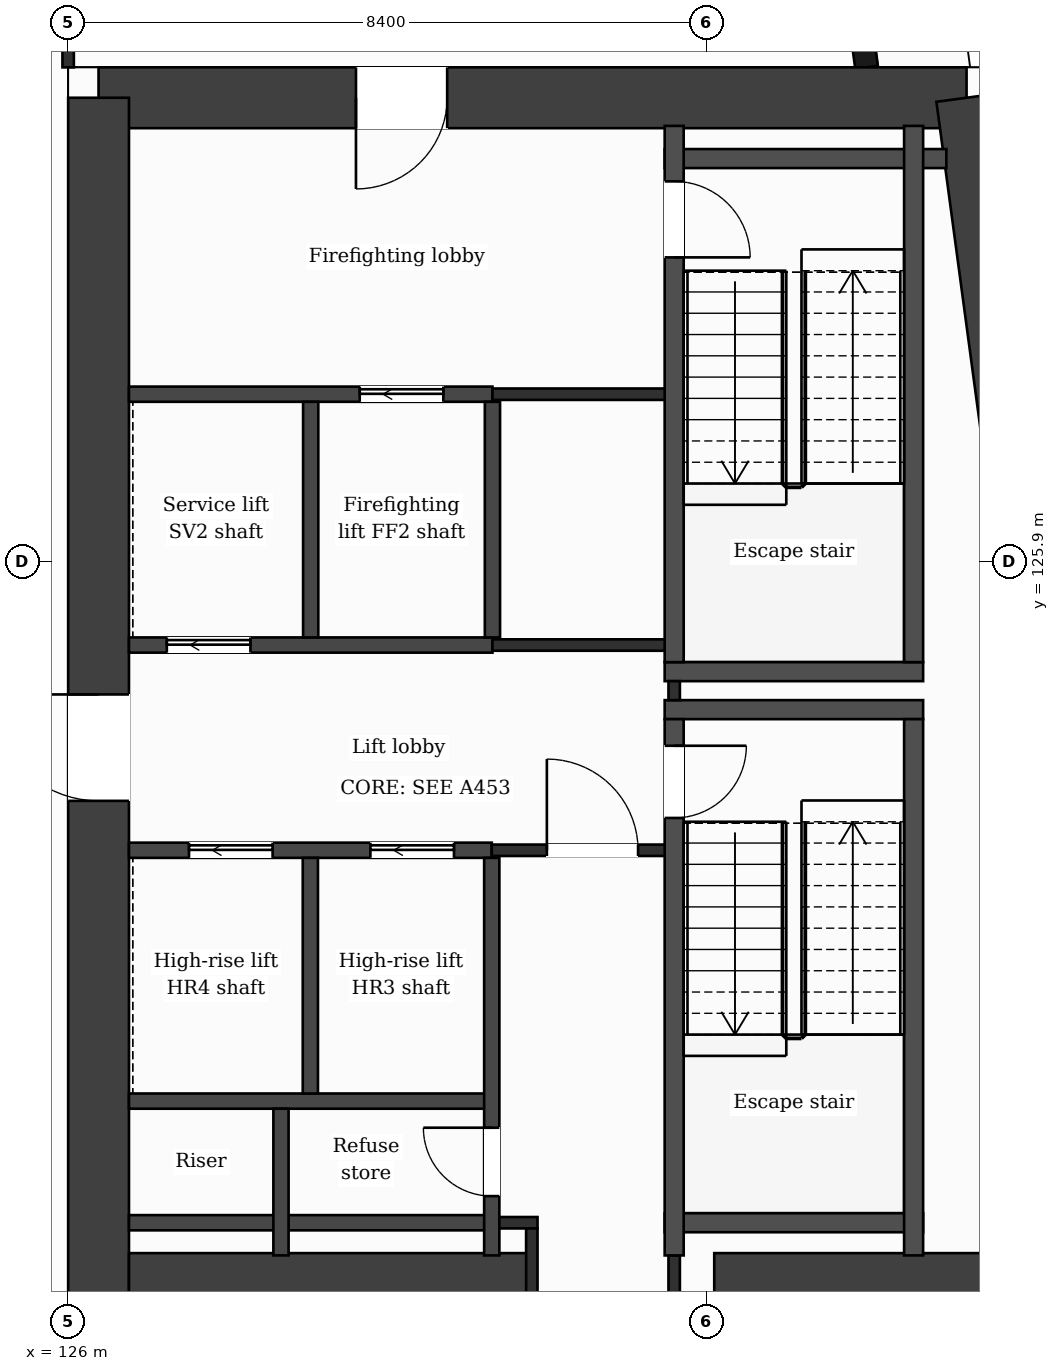
"""IFC4 building model, lengths in metres.
Left out: names, types, materials, properties, quantities, classifications, styles, units other than length and angle.
Written with IfcOpenShell. Run it as: python <this file> out.ifc"""

import sys

from ifc_helpers import new_model, si_unit, direction, frame, frame_2d, origin, place, context, subcontext, project, spatial, rectangle, extrude, element, fill, save


model = new_model("IFC4")
c1 = context("Model", 3, precision=1e-05, world=origin(), true_north=direction((0.0, 1.0)))
c2 = subcontext(c1, "Body", "Model", "MODEL_VIEW")
j1 = project(units=[si_unit("LENGTHUNIT", "METRE"), si_unit("PLANEANGLEUNIT", "RADIAN")], contexts=[c1])
p1 = place(None, origin())
s1 = spatial("IfcSite", under=j1, at=p1, CompositionType="ELEMENT")
p2 = place(p1, origin())
s2 = spatial("IfcBuilding", under=s1, at=p2, CompositionType="ELEMENT")
p3 = place(p2, frame((0.0, 0.0, 217.0)))
s3 = spatial("IfcBuildingStorey", under=s2, at=p3, CompositionType="ELEMENT", Elevation=217.0)
p4 = place(p3, frame((126.4, 132.0, 0.0), z_axis=(0.0, 0.0, 1.0), x_axis=(1.0, 0.0, 0.0)))
e1 = element("IfcWall", 1, at=p4, inside=s3, PredefinedType="SHEAR", context=c2, shape_type="SweptSolid", body=[
    extrude(rectangle(XDim=11.42, YDim=0.8, at=frame_2d((5.71, 0.0))), origin(), (0.0, 0.0, 1.0), 3.7),
])
p5 = place(p4, frame((3.386, 0.0, 0.0)))
e2 = element("IfcOpeningElement", 2, at=p5, cuts=e1, PredefinedType="OPENING", context=c2, shape_type="SweptSolid", body=[
    extrude(rectangle(XDim=1.2, YDim=2.1, at=frame_2d((0.6, 1.05))), frame((0.0, 0.41, 0.0), z_axis=(0.0, -1.0, 0.0), x_axis=(1.0, 0.0, 0.0)), (0.0, 0.0, 1.0), 0.82),
])
p6 = place(p3, frame((137.82, 132.0, 0.0), z_axis=(0.0, 0.0, 1.0), x_axis=(0.133408347329, -0.991061154956, 0.0)))
e3 = element("IfcWall", 3, at=p6, inside=s3, PredefinedType="SHEAR", context=c2, shape_type="SweptSolid", body=[
    extrude(rectangle(XDim=21.391, YDim=0.8, at=frame_2d((10.696, 0.0))), origin(), (0.0, 0.0, 1.0), 3.7),
])
p7 = place(p3, frame((126.4, 110.8, 0.0), z_axis=(0.0, 0.0, 1.0), x_axis=(0.0, 1.0, 0.0)))
e4 = element("IfcWall", 4, at=p7, inside=s3, PredefinedType="SHEAR", context=c2, shape_type="SweptSolid", body=[
    extrude(rectangle(XDim=21.2, YDim=0.8, at=frame_2d((10.6, 0.0))), origin(), (0.0, 0.0, 1.0), 3.7),
])
p8 = place(p7, frame((11.95, 0.0, 0.0)))
e5 = element("IfcOpeningElement", 5, at=p8, cuts=e4, PredefinedType="OPENING", context=c2, shape_type="SweptSolid", body=[
    extrude(rectangle(XDim=1.4, YDim=2.1, at=frame_2d((0.7, 1.05))), frame((0.0, 0.41, 0.0), z_axis=(0.0, -1.0, 0.0), x_axis=(1.0, 0.0, 0.0)), (0.0, 0.0, 1.0), 0.82),
])
p9 = place(p3, frame((126.8, 116.4, 0.0), z_axis=(0.0, 0.0, 1.0), x_axis=(1.0, 0.0, 0.0)))
e6 = element("IfcWall", 6, at=p9, inside=s3, PredefinedType="SHEAR", context=c2, shape_type="SweptSolid", body=[
    extrude(rectangle(XDim=5.3, YDim=0.8, at=frame_2d((2.65, 0.0))), origin(), (0.0, 0.0, 1.0), 3.7),
])
p10 = place(p3, frame((134.5, 116.4, 0.0), z_axis=(0.0, 0.0, 1.0), x_axis=(1.0, 0.0, 0.0)))
e7 = element("IfcWall", 7, at=p10, inside=s3, PredefinedType="SHEAR", context=c2, shape_type="SweptSolid", body=[
    extrude(rectangle(XDim=5.077, YDim=0.8, at=frame_2d((2.539, 0.0))), origin(), (0.0, 0.0, 1.0), 3.7),
])
p11 = place(p3, frame((136.504, 132.4, 0.0), z_axis=(0.0, 0.0, 1.0), x_axis=(-0.133399697462, 0.99106231929, 0.0)))
e8 = element("IfcWall", 8, at=p11, inside=s3, PredefinedType="SOLIDWALL", context=c2, shape_type="SweptSolid", body=[
    extrude(rectangle(XDim=6.74, YDim=0.3, at=frame_2d((3.37, 0.0))), origin(), (0.0, 0.0, 1.0), 3.38),
])
p12 = place(p11, frame((1.115, 0.0, 0.0)))
e9 = element("IfcOpeningElement", 9, at=p12, cuts=e8, PredefinedType="OPENING", context=c2, shape_type="SweptSolid", body=[
    extrude(rectangle(XDim=1.2, YDim=2.4, at=frame_2d((0.6, 1.2))), frame((0.0, 0.16, 0.0), z_axis=(0.0, -1.0, 0.0), x_axis=(1.0, 0.0, 0.0)), (0.0, 0.0, 1.0), 0.32),
])
p13 = place(p11, frame((3.835, 0.0, 0.9)))
e10 = element("IfcOpeningElement", 10, at=p13, cuts=e8, PredefinedType="OPENING", context=c2, shape_type="SweptSolid", body=[
    extrude(rectangle(XDim=2.4, YDim=2.1, at=frame_2d((1.2, 1.05))), frame((0.0, 0.16, 0.0), z_axis=(0.0, -1.0, 0.0), x_axis=(1.0, 0.0, 0.0)), (0.0, 0.0, 1.0), 0.32),
])
p14 = place(p3, frame((126.8, 117.2, 0.0), z_axis=(0.0, 0.0, 1.0), x_axis=(1.0, 0.0, 0.0)))
e11 = element("IfcWall", 11, at=p14, inside=s3, PredefinedType="PARTITIONING", context=c2, shape_type="SweptSolid", body=[
    extrude(rectangle(XDim=4.773, YDim=0.2, at=frame_2d((2.386, 0.0))), origin(), (0.0, 0.0, 1.0), 3.38),
])
p15 = place(p3, frame((131.573, 117.2, 0.0), z_axis=(0.0, 0.0, 1.0), x_axis=(1.0, 0.0, 0.0)))
e12 = element("IfcWall", 12, at=p15, inside=s3, PredefinedType="PARTITIONING", context=c2, shape_type="SweptSolid", body=[
    extrude(rectangle(XDim=0.602, YDim=0.15, at=frame_2d((0.301, 0.0))), origin(), (0.0, 0.0, 1.0), 3.38),
])
p16 = place(p3, frame((133.848, 117.2, 0.0), z_axis=(0.0, 0.0, 1.0), x_axis=(1.0, 0.0, 0.0)))
e13 = element("IfcWall", 13, at=p16, inside=s3, PredefinedType="PARTITIONING", context=c2, shape_type="SweptSolid", body=[
    extrude(rectangle(XDim=3.4, YDim=0.25, at=frame_2d((1.7, 0.0))), origin(), (0.0, 0.0, 1.0), 3.38),
])
p17 = place(p3, frame((126.8, 118.8, 0.0), z_axis=(0.0, 0.0, 1.0), x_axis=(1.0, 0.0, 0.0)))
e14 = element("IfcWall", 14, at=p17, inside=s3, PredefinedType="PARTITIONING", context=c2, shape_type="SweptSolid", body=[
    extrude(rectangle(XDim=4.773, YDim=0.2, at=frame_2d((2.386, 0.0))), origin(), (0.0, 0.0, 1.0), 3.38),
])
p18 = place(p3, frame((126.8, 122.1, 0.0), z_axis=(0.0, 0.0, 1.0), x_axis=(1.0, 0.0, 0.0)))
e15 = element("IfcWall", 15, at=p18, inside=s3, PredefinedType="PARTITIONING", context=c2, shape_type="SweptSolid", body=[
    extrude(rectangle(XDim=4.773, YDim=0.2, at=frame_2d((2.386, 0.0))), origin(), (0.0, 0.0, 1.0), 3.38),
])
p19 = place(p18, frame((3.176, 0.0, 0.0)))
e16 = element("IfcOpeningElement", 16, at=p19, cuts=e15, PredefinedType="OPENING", context=c2, shape_type="SweptSolid", body=[
    extrude(rectangle(XDim=1.1, YDim=2.1, at=frame_2d((0.55, 1.05))), frame((0.0, 0.11, 0.0), z_axis=(0.0, -1.0, 0.0), x_axis=(1.0, 0.0, 0.0)), (0.0, 0.0, 1.0), 0.22),
])
p20 = place(p18, frame((0.79, 0.0, 0.0)))
e17 = element("IfcOpeningElement", 17, at=p20, cuts=e15, PredefinedType="OPENING", context=c2, shape_type="SweptSolid", body=[
    extrude(rectangle(XDim=1.1, YDim=2.1, at=frame_2d((0.55, 1.05))), frame((0.0, 0.11, 0.0), z_axis=(0.0, -1.0, 0.0), x_axis=(1.0, 0.0, 0.0)), (0.0, 0.0, 1.0), 0.22),
])
p21 = place(p3, frame((131.573, 122.1, 0.0), z_axis=(0.0, 0.0, 1.0), x_axis=(1.0, 0.0, 0.0)))
e18 = element("IfcWall", 18, at=p21, inside=s3, PredefinedType="PARTITIONING", context=c2, shape_type="SweptSolid", body=[
    extrude(rectangle(XDim=2.4, YDim=0.15, at=frame_2d((1.2, 0.0))), origin(), (0.0, 0.0, 1.0), 3.38),
])
p22 = place(p21, frame((0.725, 0.0, 0.0)))
e19 = element("IfcOpeningElement", 19, at=p22, cuts=e18, PredefinedType="OPENING", context=c2, shape_type="SweptSolid", body=[
    extrude(rectangle(XDim=1.2, YDim=2.1, at=frame_2d((0.6, 1.05))), frame((0.0, 0.085, 0.0), z_axis=(0.0, -1.0, 0.0), x_axis=(1.0, 0.0, 0.0)), (0.0, 0.0, 1.0), 0.17),
])
for number, where, z_axis, x_axis in (
    (20, (133.848, 123.95, 0.0), (0.0, 0.0, 1.0), (1.0, 0.0, 0.0)),
    (21, (133.848, 124.45, 0.0), (0.0, 0.0, 1.0), (1.0, 0.0, 0.0)),
):
    element("IfcWall", number, at=place(p3, frame(where, z_axis=z_axis, x_axis=x_axis)), inside=s3, PredefinedType="PARTITIONING", context=c2, shape_type="SweptSolid", body=[
        extrude(rectangle(XDim=3.4, YDim=0.25, at=frame_2d((1.7, 0.0))), origin(), (0.0, 0.0, 1.0), 3.38),
    ])
p23 = place(p3, frame((126.8, 124.8, 0.0), z_axis=(0.0, 0.0, 1.0), x_axis=(1.0, 0.0, 0.0)))
e22 = element("IfcWall", 22, at=p23, inside=s3, PredefinedType="PARTITIONING", context=c2, shape_type="SweptSolid", body=[
    extrude(rectangle(XDim=4.782, YDim=0.2, at=frame_2d((2.391, 0.0))), origin(), (0.0, 0.0, 1.0), 3.38),
])
p24 = place(p23, frame((0.498, 0.0, 0.0)))
e23 = element("IfcOpeningElement", 23, at=p24, cuts=e22, PredefinedType="OPENING", context=c2, shape_type="SweptSolid", body=[
    extrude(rectangle(XDim=1.1, YDim=2.1, at=frame_2d((0.55, 1.05))), frame((0.0, 0.11, 0.0), z_axis=(0.0, -1.0, 0.0), x_axis=(1.0, 0.0, 0.0)), (0.0, 0.0, 1.0), 0.22),
])
p25 = place(p3, frame((131.582, 124.8, 0.0), z_axis=(0.0, 0.0, 1.0), x_axis=(1.0, 0.0, 0.0)))
e24 = element("IfcWall", 24, at=p25, inside=s3, PredefinedType="PARTITIONING", context=c2, shape_type="SweptSolid", body=[
    extrude(rectangle(XDim=2.516, YDim=0.15, at=frame_2d((1.258, 0.0))), origin(), (0.0, 0.0, 1.0), 3.38),
])
p26 = place(p3, frame((126.8, 128.1, 0.0), z_axis=(0.0, 0.0, 1.0), x_axis=(1.0, 0.0, 0.0)))
e25 = element("IfcWall", 25, at=p26, inside=s3, PredefinedType="PARTITIONING", context=c2, shape_type="SweptSolid", body=[
    extrude(rectangle(XDim=4.782, YDim=0.2, at=frame_2d((2.391, 0.0))), origin(), (0.0, 0.0, 1.0), 3.38),
])
p27 = place(p26, frame((3.036, 0.0, 0.0)))
e26 = element("IfcOpeningElement", 26, at=p27, cuts=e25, PredefinedType="OPENING", context=c2, shape_type="SweptSolid", body=[
    extrude(rectangle(XDim=1.1, YDim=2.1, at=frame_2d((0.55, 1.05))), frame((0.0, 0.11, 0.0), z_axis=(0.0, -1.0, 0.0), x_axis=(1.0, 0.0, 0.0)), (0.0, 0.0, 1.0), 0.22),
])
p28 = place(p3, frame((131.582, 128.1, 0.0), z_axis=(0.0, 0.0, 1.0), x_axis=(1.0, 0.0, 0.0)))
e27 = element("IfcWall", 27, at=p28, inside=s3, PredefinedType="PARTITIONING", context=c2, shape_type="SweptSolid", body=[
    extrude(rectangle(XDim=2.391, YDim=0.15, at=frame_2d((1.195, 0.0))), origin(), (0.0, 0.0, 1.0), 3.38),
])
p29 = place(p3, frame((133.848, 131.2, 0.0), z_axis=(0.0, 0.0, 1.0), x_axis=(1.0, 0.0, 0.0)))
e28 = element("IfcWall", 28, at=p29, inside=s3, PredefinedType="PARTITIONING", context=c2, shape_type="SweptSolid", body=[
    extrude(rectangle(XDim=3.706, YDim=0.25, at=frame_2d((1.853, 0.0))), origin(), (0.0, 0.0, 1.0), 3.38),
])
p30 = place(p3, frame((126.0, 132.4, 0.0), z_axis=(0.0, 0.0, 1.0), x_axis=(0.0, 1.0, 0.0)))
e29 = element("IfcWall", 29, at=p30, inside=s3, PredefinedType="PARTITIONING", context=c2, shape_type="SweptSolid", body=[
    extrude(rectangle(XDim=1.325, YDim=0.15, at=frame_2d((0.663, 0.0))), origin(), (0.0, 0.0, 1.0), 3.38),
])
p31 = place(p3, frame((128.8, 116.77, 0.0), z_axis=(0.0, 0.0, 1.0), x_axis=(0.0, 1.0, 0.0)))
e30 = element("IfcWall", 30, at=p31, inside=s3, PredefinedType="PARTITIONING", context=c2, shape_type="SweptSolid", body=[
    extrude(rectangle(XDim=1.93, YDim=0.2, at=frame_2d((0.965, 0.0))), origin(), (0.0, 0.0, 1.0), 3.38),
])
for number, where, z_axis, x_axis in (
    (31, (129.187, 118.9, 0.0), (0.0, 0.0, 1.0), (0.0, 1.0, 0.0)),
    (32, (129.191, 124.9, 0.0), (0.0, 0.0, 1.0), (0.0, 1.0, 0.0)),
):
    element("IfcWall", number, at=place(p3, frame(where, z_axis=z_axis, x_axis=x_axis)), inside=s3, PredefinedType="PARTITIONING", context=c2, shape_type="SweptSolid", body=[
        extrude(rectangle(XDim=3.1, YDim=0.2, at=frame_2d((1.55, 0.0))), origin(), (0.0, 0.0, 1.0), 3.38),
    ])
p32 = place(p3, frame((131.573, 116.77, 0.0), z_axis=(0.0, 0.0, 1.0), x_axis=(0.0, 1.0, 0.0)))
e33 = element("IfcWall", 33, at=p32, inside=s3, PredefinedType="PARTITIONING", context=c2, shape_type="SweptSolid", body=[
    extrude(rectangle(XDim=5.23, YDim=0.2, at=frame_2d((2.615, 0.0))), origin(), (0.0, 0.0, 1.0), 3.38),
])
p33 = place(p32, frame((0.78, 0.0, 0.0)))
e34 = element("IfcOpeningElement", 34, at=p33, cuts=e33, PredefinedType="OPENING", context=c2, shape_type="SweptSolid", body=[
    extrude(rectangle(XDim=0.9, YDim=2.1, at=frame_2d((0.45, 1.05))), frame((0.0, 0.11, 0.0), z_axis=(0.0, -1.0, 0.0), x_axis=(1.0, 0.0, 0.0)), (0.0, 0.0, 1.0), 0.22),
])
p34 = place(p3, frame((131.582, 124.9, 0.0), z_axis=(0.0, 0.0, 1.0), x_axis=(0.0, 1.0, 0.0)))
e35 = element("IfcWall", 35, at=p34, inside=s3, PredefinedType="PARTITIONING", context=c2, shape_type="SweptSolid", body=[
    extrude(rectangle(XDim=3.1, YDim=0.2, at=frame_2d((1.55, 0.0))), origin(), (0.0, 0.0, 1.0), 3.38),
])
p35 = place(p3, frame((132.1, 116.0, 0.0), z_axis=(0.0, 0.0, 1.0), x_axis=(0.0, 1.0, 0.0)))
e36 = element("IfcWall", 36, at=p35, inside=s3, PredefinedType="PARTITIONING", context=c2, shape_type="SweptSolid", body=[
    extrude(rectangle(XDim=1.125, YDim=0.15, at=frame_2d((0.562, 0.0))), origin(), (0.0, 0.0, 1.0), 3.38),
])
p36 = place(p3, frame((133.973, 116.0, 0.0), z_axis=(0.0, 0.0, 1.0), x_axis=(0.0, 1.0, 0.0)))
e37 = element("IfcWall", 37, at=p36, inside=s3, PredefinedType="PARTITIONING", context=c2, shape_type="SweptSolid", body=[
    extrude(rectangle(XDim=0.77, YDim=0.15, at=frame_2d((0.385, 0.0))), origin(), (0.0, 0.0, 1.0), 3.38),
])
p37 = place(p3, frame((133.973, 124.075, 0.0), z_axis=(0.0, 0.0, 1.0), x_axis=(0.0, 1.0, 0.0)))
e38 = element("IfcWall", 38, at=p37, inside=s3, PredefinedType="PARTITIONING", context=c2, shape_type="SweptSolid", body=[
    extrude(rectangle(XDim=0.25, YDim=0.15, at=frame_2d((0.125, 0.0))), origin(), (0.0, 0.0, 1.0), 3.38),
])
p38 = place(p3, frame((133.973, 116.77, 0.0), z_axis=(0.0, 0.0, 1.0), x_axis=(0.0, 1.0, 0.0)))
e39 = element("IfcWall", 39, at=p38, inside=s3, PredefinedType="PARTITIONING", context=c2, shape_type="SweptSolid", body=[
    extrude(rectangle(XDim=7.055, YDim=0.25, at=frame_2d((3.527, 0.0))), origin(), (0.0, 0.0, 1.0), 3.38),
])
p39 = place(p38, frame((5.755, 0.0, 0.0)))
e40 = element("IfcOpeningElement", 40, at=p39, cuts=e39, PredefinedType="OPENING", context=c2, shape_type="SweptSolid", body=[
    extrude(rectangle(XDim=0.95, YDim=2.1, at=frame_2d((0.475, 1.05))), frame((0.0, 0.135, 0.0), z_axis=(0.0, -1.0, 0.0), x_axis=(1.0, 0.0, 0.0)), (0.0, 0.0, 1.0), 0.27),
])
p40 = place(p3, frame((133.973, 124.575, 0.0), z_axis=(0.0, 0.0, 1.0), x_axis=(0.0, 1.0, 0.0)))
e41 = element("IfcWall", 41, at=p40, inside=s3, PredefinedType="PARTITIONING", context=c2, shape_type="SweptSolid", body=[
    extrude(rectangle(XDim=7.055, YDim=0.25, at=frame_2d((3.527, 0.0))), origin(), (0.0, 0.0, 1.0), 3.38),
])
p41 = place(p40, frame((5.325, 0.0, 0.0)))
e42 = element("IfcOpeningElement", 42, at=p41, cuts=e41, PredefinedType="OPENING", context=c2, shape_type="SweptSolid", body=[
    extrude(rectangle(XDim=1.0, YDim=2.1, at=frame_2d((0.5, 1.05))), frame((0.0, 0.135, 0.0), z_axis=(0.0, -1.0, 0.0), x_axis=(1.0, 0.0, 0.0)), (0.0, 0.0, 1.0), 0.27),
])
for number, where, z_axis, x_axis in (
    (43, (137.123, 116.77, 0.0), (0.0, 0.0, 1.0), (0.0, 1.0, 0.0)),
    (44, (137.123, 124.575, 0.0), (0.0, 0.0, 1.0), (0.0, 1.0, 0.0)),
):
    element("IfcWall", number, at=place(p3, frame(where, z_axis=z_axis, x_axis=x_axis)), inside=s3, PredefinedType="PARTITIONING", context=c2, shape_type="SweptSolid", body=[
        extrude(rectangle(XDim=7.055, YDim=0.25, at=frame_2d((3.527, 0.0))), origin(), (0.0, 0.0, 1.0), 3.38),
    ])
p42 = place(p22, origin())
e45 = element("IfcDoor", 45, at=p42, inside=s3, OperationType="SINGLE_SWING_LEFT", PredefinedType="DOOR", context=c2, shape_type="SweptSolid", body=[
    extrude(rectangle(XDim=1.2, YDim=2.1, at=frame_2d((0.6, 1.05))), frame((0.0, 0.025, 0.0), z_axis=(0.0, -1.0, 0.0), x_axis=(1.0, 0.0, 0.0)), (0.0, 0.0, 1.0), 0.05),
])
fill(e19, e45)
p43 = place(p19, origin())
e46 = element("IfcDoor", 46, at=p43, inside=s3, OperationType="SLIDING_TO_LEFT", PredefinedType="DOOR", context=c2, shape_type="SweptSolid", body=[
    extrude(rectangle(XDim=1.1, YDim=2.1, at=frame_2d((0.55, 1.05))), frame((0.0, 0.025, 0.0), z_axis=(0.0, -1.0, 0.0), x_axis=(1.0, 0.0, 0.0)), (0.0, 0.0, 1.0), 0.05),
])
fill(e16, e46)
p44 = place(p20, origin())
e47 = element("IfcDoor", 47, at=p44, inside=s3, OperationType="SLIDING_TO_LEFT", PredefinedType="DOOR", context=c2, shape_type="SweptSolid", body=[
    extrude(rectangle(XDim=1.1, YDim=2.1, at=frame_2d((0.55, 1.05))), frame((0.0, 0.025, 0.0), z_axis=(0.0, -1.0, 0.0), x_axis=(1.0, 0.0, 0.0)), (0.0, 0.0, 1.0), 0.05),
])
fill(e17, e47)
p45 = place(p27, origin())
e48 = element("IfcDoor", 48, at=p45, inside=s3, OperationType="SLIDING_TO_LEFT", PredefinedType="DOOR", context=c2, shape_type="SweptSolid", body=[
    extrude(rectangle(XDim=1.1, YDim=2.1, at=frame_2d((0.55, 1.05))), frame((0.0, 0.025, 0.0), z_axis=(0.0, -1.0, 0.0), x_axis=(1.0, 0.0, 0.0)), (0.0, 0.0, 1.0), 0.05),
])
fill(e26, e48)
p46 = place(p24, origin())
e49 = element("IfcDoor", 49, at=p46, inside=s3, OperationType="SLIDING_TO_LEFT", PredefinedType="DOOR", context=c2, shape_type="SweptSolid", body=[
    extrude(rectangle(XDim=1.1, YDim=2.1, at=frame_2d((0.55, 1.05))), frame((0.0, 0.025, 0.0), z_axis=(0.0, -1.0, 0.0), x_axis=(1.0, 0.0, 0.0)), (0.0, 0.0, 1.0), 0.05),
])
fill(e23, e49)
p47 = place(p39, origin())
e50 = element("IfcDoor", 50, at=p47, inside=s3, OperationType="SINGLE_SWING_RIGHT", PredefinedType="DOOR", context=c2, shape_type="SweptSolid", body=[
    extrude(rectangle(XDim=0.95, YDim=2.1, at=frame_2d((0.475, 1.05))), frame((0.0, 0.025, 0.0), z_axis=(0.0, -1.0, 0.0), x_axis=(1.0, 0.0, 0.0)), (0.0, 0.0, 1.0), 0.05),
])
fill(e40, e50)
p48 = place(p41, origin())
e51 = element("IfcDoor", 51, at=p48, inside=s3, OperationType="SINGLE_SWING_LEFT", PredefinedType="DOOR", context=c2, shape_type="SweptSolid", body=[
    extrude(rectangle(XDim=1.0, YDim=2.1, at=frame_2d((0.5, 1.05))), frame((0.0, 0.025, 0.0), z_axis=(0.0, -1.0, 0.0), x_axis=(1.0, 0.0, 0.0)), (0.0, 0.0, 1.0), 0.05),
])
fill(e42, e51)
p49 = place(p33, origin())
e52 = element("IfcDoor", 52, at=p49, inside=s3, OperationType="SINGLE_SWING_RIGHT", PredefinedType="DOOR", context=c2, shape_type="SweptSolid", body=[
    extrude(rectangle(XDim=0.9, YDim=2.1, at=frame_2d((0.45, 1.05))), frame((0.0, 0.025, 0.0), z_axis=(0.0, -1.0, 0.0), x_axis=(1.0, 0.0, 0.0)), (0.0, 0.0, 1.0), 0.05),
])
fill(e34, e52)
p50 = place(p5, origin())
e53 = element("IfcDoor", 53, at=p50, inside=s3, OperationType="SINGLE_SWING_LEFT", PredefinedType="DOOR", context=c2, shape_type="SweptSolid", body=[
    extrude(rectangle(XDim=1.2, YDim=2.1, at=frame_2d((0.6, 1.05))), frame((0.0, 0.025, 0.0), z_axis=(0.0, -1.0, 0.0), x_axis=(1.0, 0.0, 0.0)), (0.0, 0.0, 1.0), 0.05),
])
fill(e2, e53)
p51 = place(p8, origin())
e54 = element("IfcDoor", 54, at=p51, inside=s3, OperationType="SINGLE_SWING_RIGHT", PredefinedType="DOOR", context=c2, shape_type="SweptSolid", body=[
    extrude(rectangle(XDim=1.4, YDim=2.1, at=frame_2d((0.7, 1.05))), frame((0.0, 0.025, 0.0), z_axis=(0.0, -1.0, 0.0), x_axis=(1.0, 0.0, 0.0)), (0.0, 0.0, 1.0), 0.05),
])
fill(e5, e54)
save(model, sys.argv[1])
